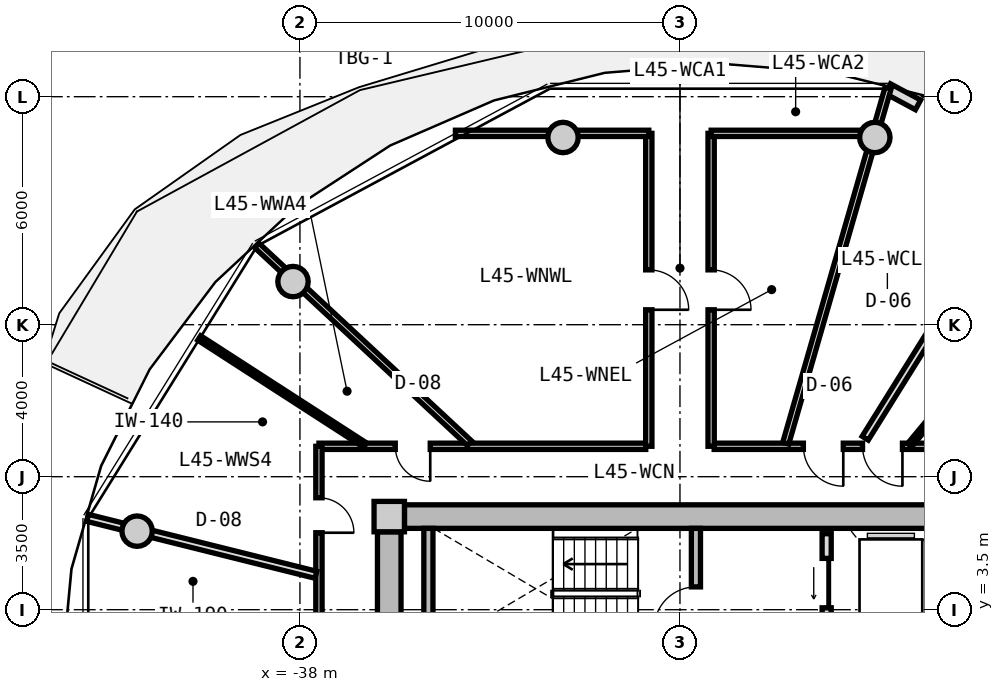
"""IFC4 building model, lengths in metres.
Left out: names, types, materials, properties, quantities, classifications, styles, units other than length and angle.
Written with IfcOpenShell. Run it as: python <this file> out.ifc"""

import sys

from ifc_helpers import new_model, si_unit, direction, frame, frame_2d, origin, origin_2d, place, context, subcontext, project, spatial, rectangle, circle, extrude, source, transform, mapped, element, fill, save


model = new_model("IFC4")
c1 = context("Model", 3, precision=1e-05, world=origin(), true_north=direction((0.0, 1.0)))
c2 = subcontext(c1, "Body", "Model", "MODEL_VIEW")
j1 = project(units=[si_unit("LENGTHUNIT", "METRE"), si_unit("PLANEANGLEUNIT", "RADIAN")], contexts=[c1])
p1 = place(None, origin())
s1 = spatial("IfcSite", under=j1, at=p1, CompositionType="ELEMENT")
p2 = place(p1, origin())
s2 = spatial("IfcBuilding", under=s1, at=p2, CompositionType="ELEMENT")
p3 = place(p2, frame((0.0, 0.0, 146.5)))
s3 = spatial("IfcBuildingStorey", under=s2, at=p3, CompositionType="ELEMENT", Elevation=146.5)
m1 = source(origin(), c2, "Body", "SweptSolid", [
    extrude(rectangle(XDim=0.8, YDim=0.8, at=origin_2d()), origin(), (0.0, 0.0, 1.0), 3.05),
])
p4 = place(p3, frame((-35.65, 5.95, 0.0), z_axis=(0.0, 0.0, 1.0), x_axis=(1.0, 0.0, 0.0)))
e1 = element("IfcColumn", 1, at=p4, inside=s3, PredefinedType="COLUMN", context=c2, shape_type="MappedRepresentation", body=[
    mapped(m1, transform((0.0, 0.0, 0.0), x_axis=(1.0, 0.0, 0.0), y_axis=(0.0, 1.0, 0.0), z_axis=(0.0, 0.0, 1.0), scale=1.0)),
])
m2 = source(origin(), c2, "Body", "SweptSolid", [
    extrude(rectangle(XDim=14.5, YDim=0.62, at=frame_2d((7.25, 0.0))), origin(), (0.0, 0.0, 1.0), 2.81),
])
p5 = place(p3, frame((-35.25, 5.95, 0.0), z_axis=(0.0, 0.0, 1.0), x_axis=(1.0, 0.0, 0.0)))
e2 = element("IfcWall", 2, at=p5, inside=s3, PredefinedType="SHEAR", context=c2, shape_type="MappedRepresentation", body=[
    mapped(m2, transform((0.0, 0.0, 0.0), x_axis=(1.0, 0.0, 0.0), y_axis=(0.0, 1.0, 0.0), z_axis=(0.0, 0.0, 1.0), scale=1.0)),
])
m3 = source(origin(), c2, "Body", "SweptSolid", [
    extrude(rectangle(XDim=11.1, YDim=0.62, at=frame_2d((5.55, 0.0))), origin(), (0.0, 0.0, 1.0), 2.81),
])
p6 = place(p3, frame((-35.65, -5.55, 0.0), z_axis=(0.0, 0.0, 1.0), x_axis=(0.0, 1.0, 0.0)))
e3 = element("IfcWall", 3, at=p6, inside=s3, PredefinedType="SHEAR", context=c2, shape_type="MappedRepresentation", body=[
    mapped(m3, transform((0.0, 0.0, 0.0), x_axis=(1.0, 0.0, 0.0), y_axis=(0.0, 1.0, 0.0), z_axis=(0.0, 0.0, 1.0), scale=1.0)),
])
p7 = place(p6, frame((3.8, 0.0, 0.0)))
e4 = element("IfcOpeningElement", 4, at=p7, cuts=e3, PredefinedType="OPENING", context=c2, shape_type="SweptSolid", body=[
    extrude(rectangle(XDim=1.2, YDim=2.15, at=frame_2d((0.6, 1.075))), frame((0.0, 0.32, 0.0), z_axis=(0.0, -1.0, 0.0), x_axis=(1.0, 0.0, 0.0)), (0.0, 0.0, 1.0), 0.64),
])
m4 = source(origin(), c2, "Body", "SweptSolid", [
    extrude(circle(Radius=0.4, at=origin_2d()), origin(), (0.0, 0.0, 1.0), 3.05),
])
for number, where, z_axis, x_axis in (
    (5, (-22.873, 15.926, 0.0), (0.0, 0.0, 1.0), (1.0, 0.0, 0.0)),
    (6, (-31.077, 15.926, 0.0), (0.0, 0.0, 1.0), (1.0, 0.0, 0.0)),
    (7, (-38.183, 12.135, 0.0), (0.0, 0.0, 1.0), (1.0, 0.0, 0.0)),
    (8, (-42.285, 5.567, 0.0), (0.0, 0.0, 1.0), (1.0, 0.0, 0.0)),
):
    element("IfcColumn", number, at=place(p3, frame(where, z_axis=z_axis, x_axis=x_axis)), inside=s3, PredefinedType="COLUMN", context=c2, shape_type="MappedRepresentation", body=[
        mapped(m4, transform((0.0, 0.0, 0.0), x_axis=(1.0, 0.0, 0.0), y_axis=(0.0, 1.0, 0.0), z_axis=(0.0, 0.0, 1.0), scale=1.0)),
    ])
m5 = source(origin(), c2, "Body", "SweptSolid", [
    extrude(rectangle(XDim=8.742, YDim=0.29, at=frame_2d((4.371, 0.0))), origin(), (0.0, 0.0, 1.0), 2.81),
])
p8 = place(p3, frame((-22.529, 17.211, 0.0), z_axis=(0.0, 0.0, 1.0), x_axis=(0.880998740657, -0.473118609823, 0.0)))
e9 = element("IfcWall", 9, at=p8, inside=s3, PredefinedType="SOLIDWALL", context=c2, shape_type="MappedRepresentation", body=[
    mapped(m5, transform((0.0, 0.0, 0.0), x_axis=(1.0, 0.0, 0.0), y_axis=(0.0, 1.0, 0.0), z_axis=(0.0, 0.0, 1.0), scale=1.0)),
])
p9 = place(p8, frame((0.9, 0.0, 0.0)))
e10 = element("IfcOpeningElement", 10, at=p9, cuts=e9, PredefinedType="OPENING", context=c2, shape_type="SweptSolid", body=[
    extrude(rectangle(XDim=1.15, YDim=2.25, at=frame_2d((0.575, 1.125))), frame((0.0, 0.155, 0.0), z_axis=(0.0, -1.0, 0.0), x_axis=(1.0, 0.0, 0.0)), (0.0, 0.0, 1.0), 0.31),
])
p10 = place(p8, frame((4.901, 0.0, 0.85)))
e11 = element("IfcOpeningElement", 11, at=p10, cuts=e9, PredefinedType="OPENING", context=c2, shape_type="SweptSolid", body=[
    extrude(rectangle(XDim=1.2, YDim=1.5, at=frame_2d((0.6, 0.75))), frame((0.0, 0.155, 0.0), z_axis=(0.0, -1.0, 0.0), x_axis=(1.0, 0.0, 0.0)), (0.0, 0.0, 1.0), 0.31),
])
m6 = source(origin(), c2, "Body", "SweptSolid", [
    extrude(rectangle(XDim=3.19, YDim=0.24, at=frame_2d((1.595, 0.0))), origin(), (0.0, 0.0, 1.0), 2.81),
])
p11 = place(p3, frame((-34.62, 2.45, 0.0), z_axis=(0.0, 0.0, 1.0), x_axis=(0.0, 1.0, 0.0)))
e12 = element("IfcWall", 12, at=p11, inside=s3, PredefinedType="PARTITIONING", context=c2, shape_type="MappedRepresentation", body=[
    mapped(m6, transform((0.0, 0.0, 0.0), x_axis=(1.0, 0.0, 0.0), y_axis=(0.0, 1.0, 0.0), z_axis=(0.0, 0.0, 1.0), scale=1.0)),
])
p12 = place(p3, frame((-27.58, 2.45, 0.0), z_axis=(0.0, 0.0, 1.0), x_axis=(0.0, 1.0, 0.0)))
e13 = element("IfcWall", 13, at=p12, inside=s3, PredefinedType="PARTITIONING", context=c2, shape_type="MappedRepresentation", body=[
    mapped(m6, transform((0.0, 0.0, 0.0), x_axis=(1.0, 0.0, 0.0), y_axis=(0.0, 1.0, 0.0), z_axis=(0.0, 0.0, 1.0), scale=1.0)),
])
p13 = place(p12, frame((0.55, 0.0, 0.0)))
e14 = element("IfcOpeningElement", 14, at=p13, cuts=e13, PredefinedType="OPENING", context=c2, shape_type="SweptSolid", body=[
    extrude(rectangle(XDim=1.1, YDim=2.15, at=frame_2d((0.55, 1.075))), frame((0.0, 0.13, 0.0), z_axis=(0.0, -1.0, 0.0), x_axis=(1.0, 0.0, 0.0)), (0.0, 0.0, 1.0), 0.26),
])
m7 = source(origin(), c2, "Body", "SweptSolid", [
    extrude(rectangle(XDim=5.0, YDim=0.24, at=frame_2d((2.5, 0.0))), origin(), (0.0, 0.0, 1.0), 2.795),
])
p14 = place(p3, frame((-24.14, 0.5, 0.0), z_axis=(0.0, 0.0, 1.0), x_axis=(0.0, 1.0, 0.0)))
e15 = element("IfcWall", 15, at=p14, inside=s3, PredefinedType="PARTITIONING", context=c2, shape_type="MappedRepresentation", body=[
    mapped(m7, transform((0.0, 0.0, 0.0), x_axis=(1.0, 0.0, 0.0), y_axis=(0.0, 1.0, 0.0), z_axis=(0.0, 0.0, 1.0), scale=1.0)),
])
p15 = place(p14, frame((3.05, 0.0, 0.0)))
e16 = element("IfcOpeningElement", 16, at=p15, cuts=e15, PredefinedType="OPENING", context=c2, shape_type="SweptSolid", body=[
    extrude(rectangle(XDim=1.3, YDim=2.2, at=frame_2d((0.65, 1.1))), frame((0.0, 0.13, 0.0), z_axis=(0.0, -1.0, 0.0), x_axis=(1.0, 0.0, 0.0)), (0.0, 0.0, 1.0), 0.26),
])
p16 = place(p14, frame((0.55, 0.0, 0.0)))
e17 = element("IfcOpeningElement", 17, at=p16, cuts=e15, PredefinedType="OPENING", context=c2, shape_type="SweptSolid", body=[
    extrude(rectangle(XDim=1.3, YDim=2.2, at=frame_2d((0.65, 1.1))), frame((0.0, 0.13, 0.0), z_axis=(0.0, -1.0, 0.0), x_axis=(1.0, 0.0, 0.0)), (0.0, 0.0, 1.0), 0.26),
])
m8 = source(origin(), c2, "Body", "SweptSolid", [
    extrude(rectangle(XDim=8.6, YDim=0.165, at=frame_2d((4.3, 0.0))), origin(), (0.0, 0.0, 1.0), 2.795),
])
p17 = place(p3, frame((-37.5, 7.8, 0.0), z_axis=(0.0, 0.0, 1.0), x_axis=(1.0, 0.0, 0.0)))
e18 = element("IfcWall", 18, at=p17, inside=s3, PredefinedType="PARTITIONING", context=c2, shape_type="MappedRepresentation", body=[
    mapped(m8, transform((0.0, 0.0, 0.0), x_axis=(1.0, 0.0, 0.0), y_axis=(0.0, 1.0, 0.0), z_axis=(0.0, 0.0, 1.0), scale=1.0)),
])
p18 = place(p17, frame((2.009, 0.0, 0.0)))
e19 = element("IfcOpeningElement", 19, at=p18, cuts=e18, PredefinedType="OPENING", context=c2, shape_type="SweptSolid", body=[
    extrude(rectangle(XDim=0.92, YDim=2.1, at=frame_2d((0.46, 1.05))), frame((0.0, 0.093, 0.0), z_axis=(0.0, -1.0, 0.0), x_axis=(1.0, 0.0, 0.0)), (0.0, 0.0, 1.0), 0.185),
])
p19 = place(p3, frame((-27.1, 7.8, 0.0), z_axis=(0.0, 0.0, 1.0), x_axis=(1.0, 0.0, 0.0)))
e20 = element("IfcWall", 20, at=p19, inside=s3, PredefinedType="PARTITIONING", context=c2, shape_type="MappedRepresentation", body=[
    mapped(m8, transform((0.0, 0.0, 0.0), x_axis=(1.0, 0.0, 0.0), y_axis=(0.0, 1.0, 0.0), z_axis=(0.0, 0.0, 1.0), scale=1.0)),
])
p20 = place(p19, frame((6.96, 0.0, 0.0)))
e21 = element("IfcOpeningElement", 21, at=p20, cuts=e20, PredefinedType="OPENING", context=c2, shape_type="SweptSolid", body=[
    extrude(rectangle(XDim=1.05, YDim=2.15, at=frame_2d((0.525, 1.075))), frame((0.0, 0.093, 0.0), z_axis=(0.0, -1.0, 0.0), x_axis=(1.0, 0.0, 0.0)), (0.0, 0.0, 1.0), 0.185),
])
p21 = place(p19, frame((3.904, 0.0, 0.0)))
e22 = element("IfcOpeningElement", 22, at=p21, cuts=e20, PredefinedType="OPENING", context=c2, shape_type="SweptSolid", body=[
    extrude(rectangle(XDim=1.05, YDim=2.15, at=frame_2d((0.525, 1.075))), frame((0.0, 0.093, 0.0), z_axis=(0.0, -1.0, 0.0), x_axis=(1.0, 0.0, 0.0)), (0.0, 0.0, 1.0), 0.185),
])
p22 = place(p19, frame((2.347, 0.0, 0.0)))
e23 = element("IfcOpeningElement", 23, at=p22, cuts=e20, PredefinedType="OPENING", context=c2, shape_type="SweptSolid", body=[
    extrude(rectangle(XDim=1.05, YDim=2.15, at=frame_2d((0.525, 1.075))), frame((0.0, 0.093, 0.0), z_axis=(0.0, -1.0, 0.0), x_axis=(1.0, 0.0, 0.0)), (0.0, 0.0, 1.0), 0.185),
])
m9 = source(origin(), c2, "Body", "SweptSolid", [
    extrude(rectangle(XDim=15.6, YDim=0.165, at=frame_2d((7.8, 0.0))), origin(), (0.0, 0.0, 1.0), 2.795),
])
p23 = place(p3, frame((-37.5, -7.8, 0.0), z_axis=(0.0, 0.0, 1.0), x_axis=(0.0, 1.0, 0.0)))
e24 = element("IfcWall", 24, at=p23, inside=s3, PredefinedType="PARTITIONING", context=c2, shape_type="MappedRepresentation", body=[
    mapped(m9, transform((0.0, 0.0, 0.0), x_axis=(1.0, 0.0, 0.0), y_axis=(0.0, 1.0, 0.0), z_axis=(0.0, 0.0, 1.0), scale=1.0)),
])
p24 = place(p23, frame((13.325, 0.0, 0.0)))
e25 = element("IfcOpeningElement", 25, at=p24, cuts=e24, PredefinedType="OPENING", context=c2, shape_type="SweptSolid", body=[
    extrude(rectangle(XDim=0.92, YDim=2.1, at=frame_2d((0.46, 1.05))), frame((0.0, 0.093, 0.0), z_axis=(0.0, -1.0, 0.0), x_axis=(1.0, 0.0, 0.0)), (0.0, 0.0, 1.0), 0.185),
])
p25 = place(p23, frame((5.628, 0.0, 0.0)))
e26 = element("IfcOpeningElement", 26, at=p25, cuts=e24, PredefinedType="OPENING", context=c2, shape_type="SweptSolid", body=[
    extrude(rectangle(XDim=1.25, YDim=2.2, at=frame_2d((0.625, 1.1))), frame((0.0, 0.093, 0.0), z_axis=(0.0, -1.0, 0.0), x_axis=(1.0, 0.0, 0.0)), (0.0, 0.0, 1.0), 0.185),
])
m10 = source(origin(), c2, "Body", "SweptSolid", [
    extrude(rectangle(XDim=9.73, YDim=0.165, at=frame_2d((4.865, 0.0))), origin(), (0.0, 0.0, 1.0), 2.345),
])
p26 = place(p3, frame((-25.217, 7.88, 0.0), z_axis=(0.0, 0.0, 1.0), x_axis=(0.27679492614, 0.960929013436, 0.0)))
e27 = element("IfcWall", 27, at=p26, inside=s3, PredefinedType="PARTITIONING", context=c2, shape_type="MappedRepresentation", body=[
    mapped(m10, transform((0.0, 0.0, 0.0), x_axis=(1.0, 0.0, 0.0), y_axis=(0.0, 1.0, 0.0), z_axis=(0.0, 0.0, 1.0), scale=1.0)),
])
m11 = source(origin(), c2, "Body", "SweptSolid", [
    extrude(rectangle(XDim=7.648, YDim=0.165, at=frame_2d((3.824, 0.0))), origin(), (0.0, 0.0, 1.0), 2.345),
])
p27 = place(p3, frame((-33.538, 7.88, 0.0), z_axis=(0.0, 0.0, 1.0), x_axis=(-0.732167856666, 0.681124239522, 0.0)))
e28 = element("IfcWall", 28, at=p27, inside=s3, PredefinedType="PARTITIONING", context=c2, shape_type="MappedRepresentation", body=[
    mapped(m11, transform((0.0, 0.0, 0.0), x_axis=(1.0, 0.0, 0.0), y_axis=(0.0, 1.0, 0.0), z_axis=(0.0, 0.0, 1.0), scale=1.0)),
])
m12 = source(origin(), c2, "Body", "SweptSolid", [
    extrude(rectangle(XDim=8.235, YDim=0.165, at=frame_2d((4.118, 0.0))), origin(), (0.0, 0.0, 1.0), 2.795),
])
p28 = place(p3, frame((-28.82, 7.8, 0.0), z_axis=(0.0, 0.0, 1.0), x_axis=(0.0, 1.0, 0.0)))
e29 = element("IfcWall", 29, at=p28, inside=s3, PredefinedType="PARTITIONING", context=c2, shape_type="MappedRepresentation", body=[
    mapped(m12, transform((0.0, 0.0, 0.0), x_axis=(1.0, 0.0, 0.0), y_axis=(0.0, 1.0, 0.0), z_axis=(0.0, 0.0, 1.0), scale=1.0)),
])
p29 = place(p28, frame((3.593, 0.0, 0.0)))
e30 = element("IfcOpeningElement", 30, at=p29, cuts=e29, PredefinedType="OPENING", context=c2, shape_type="SweptSolid", body=[
    extrude(rectangle(XDim=1.05, YDim=2.15, at=frame_2d((0.525, 1.075))), frame((0.0, 0.093, 0.0), z_axis=(0.0, -1.0, 0.0), x_axis=(1.0, 0.0, 0.0)), (0.0, 0.0, 1.0), 0.185),
])
m13 = source(origin(), c2, "Body", "SweptSolid", [
    extrude(rectangle(XDim=5.089, YDim=0.165, at=frame_2d((2.544, 0.0))), origin(), (0.0, 0.0, 1.0), 2.345),
])
p30 = place(p3, frame((-33.909, 16.035, 0.0), z_axis=(0.0, 0.0, 1.0), x_axis=(1.0, 0.0, 0.0)))
e31 = element("IfcWall", 31, at=p30, inside=s3, PredefinedType="PARTITIONING", context=c2, shape_type="MappedRepresentation", body=[
    mapped(m13, transform((0.0, 0.0, 0.0), x_axis=(1.0, 0.0, 0.0), y_axis=(0.0, 1.0, 0.0), z_axis=(0.0, 0.0, 1.0), scale=1.0)),
])
p31 = place(p3, frame((-27.18, 7.8, 0.0), z_axis=(0.0, 0.0, 1.0), x_axis=(0.0, 1.0, 0.0)))
e32 = element("IfcWall", 32, at=p31, inside=s3, PredefinedType="PARTITIONING", context=c2, shape_type="MappedRepresentation", body=[
    mapped(m12, transform((0.0, 0.0, 0.0), x_axis=(1.0, 0.0, 0.0), y_axis=(0.0, 1.0, 0.0), z_axis=(0.0, 0.0, 1.0), scale=1.0)),
])
p32 = place(p31, frame((3.593, 0.0, 0.0)))
e33 = element("IfcOpeningElement", 33, at=p32, cuts=e32, PredefinedType="OPENING", context=c2, shape_type="SweptSolid", body=[
    extrude(rectangle(XDim=1.05, YDim=2.15, at=frame_2d((0.525, 1.075))), frame((0.0, 0.093, 0.0), z_axis=(0.0, -1.0, 0.0), x_axis=(1.0, 0.0, 0.0)), (0.0, 0.0, 1.0), 0.185),
])
m14 = source(origin(), c2, "Body", "SweptSolid", [
    extrude(rectangle(XDim=4.469, YDim=0.165, at=frame_2d((2.234, 0.0))), origin(), (0.0, 0.0, 1.0), 2.345),
])
p33 = place(p3, frame((-27.18, 16.035, 0.0), z_axis=(0.0, 0.0, 1.0), x_axis=(1.0, 0.0, 0.0)))
e34 = element("IfcWall", 34, at=p33, inside=s3, PredefinedType="PARTITIONING", context=c2, shape_type="MappedRepresentation", body=[
    mapped(m14, transform((0.0, 0.0, 0.0), x_axis=(1.0, 0.0, 0.0), y_axis=(0.0, 1.0, 0.0), z_axis=(0.0, 0.0, 1.0), scale=1.0)),
])
m15 = source(origin(), c2, "Body", "SweptSolid", [
    extrude(rectangle(XDim=6.193, YDim=0.19, at=frame_2d((3.096, 0.0))), origin(), (0.0, 0.0, 1.0), 2.345),
])
p34 = place(p3, frame((-37.58, 4.419, 0.0), z_axis=(0.0, 0.0, 1.0), x_axis=(-0.970309243466, 0.241867674657, 0.0)))
e35 = element("IfcWall", 35, at=p34, inside=s3, PredefinedType="PARTITIONING", context=c2, shape_type="MappedRepresentation", body=[
    mapped(m15, transform((0.0, 0.0, 0.0), x_axis=(1.0, 0.0, 0.0), y_axis=(0.0, 1.0, 0.0), z_axis=(0.0, 0.0, 1.0), scale=1.0)),
])
m16 = source(origin(), c2, "Body", "SweptSolid", [
    extrude(rectangle(XDim=5.197, YDim=0.14, at=frame_2d((2.598, 0.0))), origin(), (0.0, 0.0, 1.0), 2.795),
])
p35 = place(p3, frame((-36.286, 7.83, 0.0), z_axis=(0.0, 0.0, 1.0), x_axis=(-0.839929187515, 0.542696010637, 0.0)))
e36 = element("IfcWall", 36, at=p35, inside=s3, PredefinedType="PARTITIONING", context=c2, shape_type="MappedRepresentation", body=[
    mapped(m16, transform((0.0, 0.0, 0.0), x_axis=(1.0, 0.0, 0.0), y_axis=(0.0, 1.0, 0.0), z_axis=(0.0, 0.0, 1.0), scale=1.0)),
])
m17 = source(origin(), c2, "Body", "SweptSolid", [
    extrude(rectangle(XDim=8.422, YDim=0.19, at=frame_2d((4.211, 0.0))), origin(), (0.0, 0.0, 1.0), 2.795),
])
p36 = place(p3, frame((-23.125, 8.014, 0.0), z_axis=(0.0, 0.0, 1.0), x_axis=(0.52925352896, 0.848463730565, 0.0)))
e37 = element("IfcWall", 37, at=p36, inside=s3, PredefinedType="PARTITIONING", context=c2, shape_type="MappedRepresentation", body=[
    mapped(m17, transform((0.0, 0.0, 0.0), x_axis=(1.0, 0.0, 0.0), y_axis=(0.0, 1.0, 0.0), z_axis=(0.0, 0.0, 1.0), scale=1.0)),
])
m18 = source(origin(), c2, "Body", "SweptSolid", [
    extrude(rectangle(XDim=3.593, YDim=0.14, at=frame_2d((1.797, 0.0))), origin(), (0.0, 0.0, 1.0), 2.795),
])
p37 = place(p3, frame((-21.955, 7.83, 0.0), z_axis=(0.0, 0.0, 1.0), x_axis=(0.638271060163, 0.769811700196, 0.0)))
e38 = element("IfcWall", 38, at=p37, inside=s3, PredefinedType="PARTITIONING", context=c2, shape_type="MappedRepresentation", body=[
    mapped(m18, transform((0.0, 0.0, 0.0), x_axis=(1.0, 0.0, 0.0), y_axis=(0.0, 1.0, 0.0), z_axis=(0.0, 0.0, 1.0), scale=1.0)),
])
p38 = place(p37, frame((1.337, 0.0, 0.0)))
e39 = element("IfcOpeningElement", 39, at=p38, cuts=e38, PredefinedType="OPENING", context=c2, shape_type="SweptSolid", body=[
    extrude(rectangle(XDim=0.92, YDim=2.1, at=frame_2d((0.46, 1.05))), frame((0.0, 0.08, 0.0), z_axis=(0.0, -1.0, 0.0), x_axis=(1.0, 0.0, 0.0)), (0.0, 0.0, 1.0), 0.16),
])
m19 = source(origin(), c2, "Body", "SweptSolid", [
    extrude(rectangle(XDim=1.15, YDim=2.25, at=frame_2d((0.575, 1.125))), frame((0.0, 0.025, 0.0), z_axis=(0.0, -1.0, 0.0), x_axis=(1.0, 0.0, 0.0)), (0.0, 0.0, 1.0), 0.05),
])
p39 = place(p9, origin())
e40 = element("IfcDoor", 40, at=p39, inside=s3, OperationType="SINGLE_SWING_RIGHT", PredefinedType="DOOR", context=c2, shape_type="MappedRepresentation", body=[
    mapped(m19, transform((0.0, 0.0, 0.0), x_axis=(1.0, 0.0, 0.0), y_axis=(0.0, 1.0, 0.0), z_axis=(0.0, 0.0, 1.0), scale=1.0)),
])
fill(e10, e40)
m20 = source(origin(), c2, "Body", "SweptSolid", [
    extrude(rectangle(XDim=1.1, YDim=2.15, at=frame_2d((0.55, 1.075))), frame((0.0, 0.025, 0.0), z_axis=(0.0, -1.0, 0.0), x_axis=(1.0, 0.0, 0.0)), (0.0, 0.0, 1.0), 0.05),
])
p40 = place(p13, origin())
e41 = element("IfcDoor", 41, at=p40, inside=s3, OperationType="SINGLE_SWING_LEFT", PredefinedType="DOOR", context=c2, shape_type="MappedRepresentation", body=[
    mapped(m20, transform((0.0, 0.0, 0.0), x_axis=(1.0, 0.0, 0.0), y_axis=(0.0, 1.0, 0.0), z_axis=(0.0, 0.0, 1.0), scale=1.0)),
])
fill(e14, e41)
m21 = source(origin(), c2, "Body", "SweptSolid", [
    extrude(rectangle(XDim=1.3, YDim=2.2, at=frame_2d((0.65, 1.1))), frame((0.0, 0.025, 0.0), z_axis=(0.0, -1.0, 0.0), x_axis=(1.0, 0.0, 0.0)), (0.0, 0.0, 1.0), 0.05),
])
p41 = place(p15, origin())
e42 = element("IfcDoor", 42, at=p41, inside=s3, OperationType="SLIDING_TO_LEFT", PredefinedType="DOOR", context=c2, shape_type="MappedRepresentation", body=[
    mapped(m21, transform((0.0, 0.0, 0.0), x_axis=(1.0, 0.0, 0.0), y_axis=(0.0, 1.0, 0.0), z_axis=(0.0, 0.0, 1.0), scale=1.0)),
])
fill(e16, e42)
m22 = source(origin(), c2, "Body", "SweptSolid", [
    extrude(rectangle(XDim=1.05, YDim=2.15, at=frame_2d((0.525, 1.075))), frame((0.0, 0.025, 0.0), z_axis=(0.0, -1.0, 0.0), x_axis=(1.0, 0.0, 0.0)), (0.0, 0.0, 1.0), 0.05),
])
p42 = place(p29, frame((1.05, 0.0, 0.0), z_axis=(0.0, 0.0, 1.0), x_axis=(-1.0, 0.0, 0.0)))
e43 = element("IfcDoor", 43, at=p42, inside=s3, OperationType="SINGLE_SWING_RIGHT", PredefinedType="DOOR", context=c2, shape_type="MappedRepresentation", body=[
    mapped(m22, transform((0.0, 0.0, 0.0), x_axis=(1.0, 0.0, 0.0), y_axis=(0.0, 1.0, 0.0), z_axis=(0.0, 0.0, 1.0), scale=1.0)),
])
fill(e30, e43)
p43 = place(p32, frame((1.05, 0.0, 0.0), z_axis=(0.0, 0.0, 1.0), x_axis=(-1.0, 0.0, 0.0)))
e44 = element("IfcDoor", 44, at=p43, inside=s3, OperationType="SINGLE_SWING_RIGHT", PredefinedType="DOOR", context=c2, shape_type="MappedRepresentation", body=[
    mapped(m22, transform((0.0, 0.0, 0.0), x_axis=(1.0, 0.0, 0.0), y_axis=(0.0, 1.0, 0.0), z_axis=(0.0, 0.0, 1.0), scale=1.0)),
])
fill(e33, e44)
m23 = source(origin(), c2, "Body", "SweptSolid", [
    extrude(rectangle(XDim=0.92, YDim=2.1, at=frame_2d((0.46, 1.05))), frame((0.0, 0.025, 0.0), z_axis=(0.0, -1.0, 0.0), x_axis=(1.0, 0.0, 0.0)), (0.0, 0.0, 1.0), 0.05),
])
p44 = place(p18, frame((0.92, 0.0, 0.0), z_axis=(0.0, 0.0, 1.0), x_axis=(-1.0, 0.0, 0.0)))
e45 = element("IfcDoor", 45, at=p44, inside=s3, OperationType="SINGLE_SWING_LEFT", PredefinedType="DOOR", context=c2, shape_type="MappedRepresentation", body=[
    mapped(m23, transform((0.0, 0.0, 0.0), x_axis=(1.0, 0.0, 0.0), y_axis=(0.0, 1.0, 0.0), z_axis=(0.0, 0.0, 1.0), scale=1.0)),
])
fill(e19, e45)
p45 = place(p24, frame((0.92, 0.0, 0.0), z_axis=(0.0, 0.0, 1.0), x_axis=(-1.0, 0.0, 0.0)))
e46 = element("IfcDoor", 46, at=p45, inside=s3, OperationType="SINGLE_SWING_RIGHT", PredefinedType="DOOR", context=c2, shape_type="MappedRepresentation", body=[
    mapped(m23, transform((0.0, 0.0, 0.0), x_axis=(1.0, 0.0, 0.0), y_axis=(0.0, 1.0, 0.0), z_axis=(0.0, 0.0, 1.0), scale=1.0)),
])
fill(e25, e46)
p46 = place(p21, frame((1.05, 0.0, 0.0), z_axis=(0.0, 0.0, 1.0), x_axis=(-1.0, 0.0, 0.0)))
e47 = element("IfcDoor", 47, at=p46, inside=s3, OperationType="SINGLE_SWING_LEFT", PredefinedType="DOOR", context=c2, shape_type="MappedRepresentation", body=[
    mapped(m22, transform((0.0, 0.0, 0.0), x_axis=(1.0, 0.0, 0.0), y_axis=(0.0, 1.0, 0.0), z_axis=(0.0, 0.0, 1.0), scale=1.0)),
])
fill(e22, e47)
p47 = place(p22, frame((1.05, 0.0, 0.0), z_axis=(0.0, 0.0, 1.0), x_axis=(-1.0, 0.0, 0.0)))
e48 = element("IfcDoor", 48, at=p47, inside=s3, OperationType="SINGLE_SWING_LEFT", PredefinedType="DOOR", context=c2, shape_type="MappedRepresentation", body=[
    mapped(m22, transform((0.0, 0.0, 0.0), x_axis=(1.0, 0.0, 0.0), y_axis=(0.0, 1.0, 0.0), z_axis=(0.0, 0.0, 1.0), scale=1.0)),
])
fill(e23, e48)
save(model, sys.argv[1])
